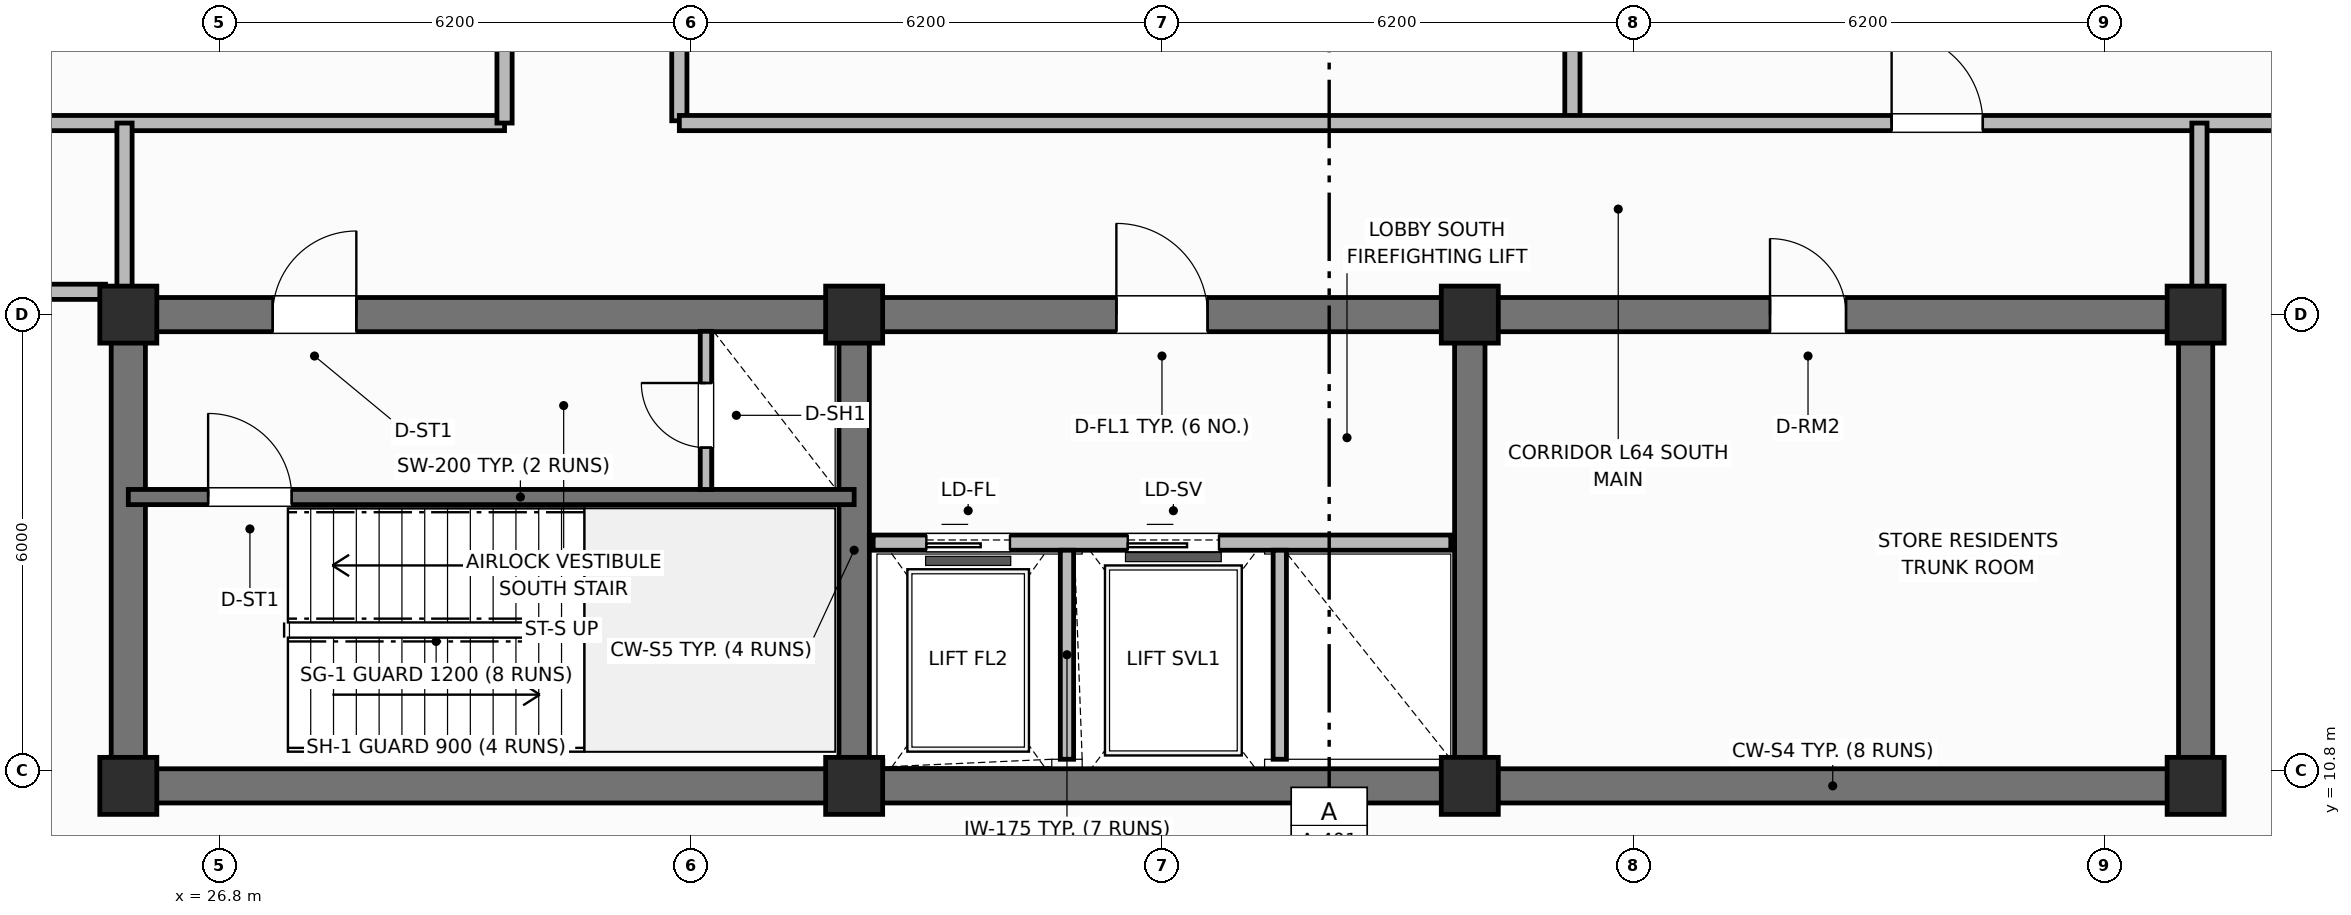
"""IFC4 building model, lengths in metres.
Left out: names, types, materials, properties, quantities, classifications, styles, units other than length and angle.
Written with IfcOpenShell. Run it as: python <this file> out.ifc"""

import sys

from ifc_helpers import new_model, si_unit, direction, frame, frame_2d, origin, origin_2d, place, context, subcontext, project, spatial, rectangle, extrude, element, fill, save


model = new_model("IFC4")
c1 = context("Model", 3, precision=1e-05, world=origin(), true_north=direction((0.0, 1.0)))
c2 = subcontext(c1, "Body", "Model", "MODEL_VIEW")
j1 = project(units=[si_unit("LENGTHUNIT", "METRE"), si_unit("PLANEANGLEUNIT", "RADIAN")], contexts=[c1])
p1 = place(None, origin())
s1 = spatial("IfcSite", under=j1, at=p1, CompositionType="ELEMENT")
p2 = place(p1, origin())
s2 = spatial("IfcBuilding", under=s1, at=p2, CompositionType="ELEMENT")
p3 = place(p2, frame((0.0, 0.0, 255.4)))
s3 = spatial("IfcBuildingStorey", under=s2, at=p3, CompositionType="ELEMENT", Elevation=255.4)
p4 = place(p3, frame((52.8, 10.6, 0.0), z_axis=(0.0, 0.0, 1.0), x_axis=(-1.0, 0.0, 0.0)))
e1 = element("IfcWall", 1, at=p4, inside=s3, PredefinedType="SHEAR", context=c2, shape_type="SweptSolid", body=[
    extrude(rectangle(XDim=27.2, YDim=0.45, at=frame_2d((13.6, 0.0))), origin(), (0.0, 0.0, 1.0), 4.8),
])
for number, where, z_axis, x_axis in (
    (2, (25.6, 10.825, 0.0), (0.0, 0.0, 1.0), (0.0, 1.0, 0.0)),
    (3, (52.8, 10.825, 0.0), (0.0, 0.0, 1.0), (0.0, 1.0, 0.0)),
):
    element("IfcWall", number, at=place(p3, frame(where, z_axis=z_axis, x_axis=x_axis)), inside=s3, PredefinedType="SHEAR", context=c2, shape_type="SweptSolid", body=[
        extrude(rectangle(XDim=5.75, YDim=0.45, at=frame_2d((2.875, 0.0))), origin(), (0.0, 0.0, 1.0), 4.8),
    ])
p5 = place(p3, frame((25.6, 16.8, 0.0), z_axis=(0.0, 0.0, 1.0), x_axis=(1.0, 0.0, 0.0)))
e4 = element("IfcWall", 4, at=p5, inside=s3, PredefinedType="SHEAR", context=c2, shape_type="SweptSolid", body=[
    extrude(rectangle(XDim=27.2, YDim=0.45, at=frame_2d((13.6, 0.0))), origin(), (0.0, 0.0, 1.0), 4.8),
])
p6 = place(p5, frame((1.9, 0.0, 0.0)))
e5 = element("IfcOpeningElement", 5, at=p6, cuts=e4, PredefinedType="OPENING", context=c2, shape_type="SweptSolid", body=[
    extrude(rectangle(XDim=1.1, YDim=2.15, at=frame_2d((0.55, 1.075))), frame((0.0, 0.235, 0.0), z_axis=(0.0, -1.0, 0.0), x_axis=(1.0, 0.0, 0.0)), (0.0, 0.0, 1.0), 0.47),
])
p7 = place(p5, frame((13.0, 0.0, 0.0)))
e6 = element("IfcOpeningElement", 6, at=p7, cuts=e4, PredefinedType="OPENING", context=c2, shape_type="SweptSolid", body=[
    extrude(rectangle(XDim=1.2, YDim=2.15, at=frame_2d((0.6, 1.075))), frame((0.0, 0.235, 0.0), z_axis=(0.0, -1.0, 0.0), x_axis=(1.0, 0.0, 0.0)), (0.0, 0.0, 1.0), 0.47),
])
p8 = place(p5, frame((21.6, 0.0, 0.0)))
e7 = element("IfcOpeningElement", 7, at=p8, cuts=e4, PredefinedType="OPENING", context=c2, shape_type="SweptSolid", body=[
    extrude(rectangle(XDim=1.0, YDim=2.15, at=frame_2d((0.5, 1.075))), frame((0.0, 0.235, 0.0), z_axis=(0.0, -1.0, 0.0), x_axis=(1.0, 0.0, 0.0)), (0.0, 0.0, 1.0), 0.47),
])
for number, where, z_axis, x_axis in (
    (8, (35.15, 10.825, 0.0), (0.0, 0.0, 1.0), (0.0, 1.0, 0.0)),
    (9, (43.25, 10.825, 0.0), (0.0, 0.0, 1.0), (0.0, 1.0, 0.0)),
):
    element("IfcWall", number, at=place(p3, frame(where, z_axis=z_axis, x_axis=x_axis)), inside=s3, PredefinedType="SHEAR", context=c2, shape_type="SweptSolid", body=[
        extrude(rectangle(XDim=5.75, YDim=0.4, at=frame_2d((2.875, 0.0))), origin(), (0.0, 0.0, 1.0), 4.8),
    ])
for number, where, z_axis, x_axis in (
    (10, (25.6, 10.6, 0.0), (0.0, 0.0, 1.0), (1.0, 0.0, 0.0)),
    (11, (25.6, 16.8, 0.0), (0.0, 0.0, 1.0), (1.0, 0.0, 0.0)),
    (12, (35.15, 10.6, 0.0), (0.0, 0.0, 1.0), (1.0, 0.0, 0.0)),
    (13, (35.15, 16.8, 0.0), (0.0, 0.0, 1.0), (1.0, 0.0, 0.0)),
    (14, (43.25, 10.6, 0.0), (0.0, 0.0, 1.0), (1.0, 0.0, 0.0)),
    (15, (43.25, 16.8, 0.0), (0.0, 0.0, 1.0), (1.0, 0.0, 0.0)),
    (16, (52.8, 10.6, 0.0), (0.0, 0.0, 1.0), (1.0, 0.0, 0.0)),
    (17, (52.8, 16.8, 0.0), (0.0, 0.0, 1.0), (1.0, 0.0, 0.0)),
):
    element("IfcColumn", number, at=place(p3, frame(where, z_axis=z_axis, x_axis=x_axis)), inside=s3, PredefinedType="COLUMN", context=c2, shape_type="SweptSolid", body=[
        extrude(rectangle(XDim=0.75, YDim=0.75, at=origin_2d()), origin(), (0.0, 0.0, 1.0), 4.8),
    ])
p9 = place(p3, frame((25.6, 14.4, 0.0), z_axis=(0.0, 0.0, 1.0), x_axis=(1.0, 0.0, 0.0)))
e18 = element("IfcWall", 18, at=p9, inside=s3, PredefinedType="SHEAR", context=c2, shape_type="SweptSolid", body=[
    extrude(rectangle(XDim=9.55, YDim=0.2, at=frame_2d((4.775, 0.0))), origin(), (0.0, 0.0, 1.0), 4.8),
])
p10 = place(p9, frame((1.05, 0.0, 0.0)))
e19 = element("IfcOpeningElement", 19, at=p10, cuts=e18, PredefinedType="OPENING", context=c2, shape_type="SweptSolid", body=[
    extrude(rectangle(XDim=1.1, YDim=2.15, at=frame_2d((0.55, 1.075))), frame((0.0, 0.11, 0.0), z_axis=(0.0, -1.0, 0.0), x_axis=(1.0, 0.0, 0.0)), (0.0, 0.0, 1.0), 0.22),
])
p11 = place(p3, frame((33.2, 14.5, 0.0), z_axis=(0.0, 0.0, 1.0), x_axis=(0.0, 1.0, 0.0)))
e20 = element("IfcWall", 20, at=p11, inside=s3, PredefinedType="PARTITIONING", context=c2, shape_type="SweptSolid", body=[
    extrude(rectangle(XDim=2.08, YDim=0.15, at=frame_2d((1.04, 0.0))), origin(), (0.0, 0.0, 1.0), 3.66),
])
p12 = place(p11, frame((0.55, 0.0, 0.0)))
e21 = element("IfcOpeningElement", 21, at=p12, cuts=e20, PredefinedType="OPENING", context=c2, shape_type="SweptSolid", body=[
    extrude(rectangle(XDim=0.85, YDim=2.05, at=frame_2d((0.425, 1.025))), frame((0.0, 0.085, 0.0), z_axis=(0.0, -1.0, 0.0), x_axis=(1.0, 0.0, 0.0)), (0.0, 0.0, 1.0), 0.17),
])
p13 = place(p3, frame((35.4, 13.8, 0.0), z_axis=(0.0, 0.0, 1.0), x_axis=(1.0, 0.0, 0.0)))
e22 = element("IfcWall", 22, at=p13, inside=s3, PredefinedType="PARTITIONING", context=c2, shape_type="SweptSolid", body=[
    extrude(rectangle(XDim=7.6, YDim=0.2, at=frame_2d((3.8, 0.0))), origin(), (0.0, 0.0, 1.0), 3.43),
])
p14 = place(p13, frame((0.7, 0.0, 0.0)))
e23 = element("IfcOpeningElement", 23, at=p14, cuts=e22, PredefinedType="OPENING", context=c2, shape_type="SweptSolid", body=[
    extrude(rectangle(XDim=1.1, YDim=2.15, at=frame_2d((0.55, 1.075))), frame((0.0, 0.11, 0.0), z_axis=(0.0, -1.0, 0.0), x_axis=(1.0, 0.0, 0.0)), (0.0, 0.0, 1.0), 0.22),
])
p15 = place(p13, frame((3.35, 0.0, 0.0)))
e24 = element("IfcOpeningElement", 24, at=p15, cuts=e22, PredefinedType="OPENING", context=c2, shape_type="SweptSolid", body=[
    extrude(rectangle(XDim=1.2, YDim=2.15, at=frame_2d((0.6, 1.075))), frame((0.0, 0.11, 0.0), z_axis=(0.0, -1.0, 0.0), x_axis=(1.0, 0.0, 0.0)), (0.0, 0.0, 1.0), 0.22),
])
for number, where, z_axis, x_axis in (
    (25, (37.95, 10.95, 0.0), (0.0, 0.0, 1.0), (0.0, 1.0, 0.0)),
    (26, (40.75, 10.95, 0.0), (0.0, 0.0, 1.0), (0.0, 1.0, 0.0)),
):
    element("IfcWall", number, at=place(p3, frame(where, z_axis=z_axis, x_axis=x_axis)), inside=s3, PredefinedType="PARTITIONING", context=c2, shape_type="SweptSolid", body=[
        extrude(rectangle(XDim=2.75, YDim=0.175, at=frame_2d((1.375, 0.0))), origin(), (0.0, 0.0, 1.0), 3.66),
    ])
p16 = place(p3, frame((19.53, 19.32, 0.0), z_axis=(0.0, 0.0, 1.0), x_axis=(1.0, 0.0, 0.0)))
e27 = element("IfcWall", 27, at=p16, inside=s3, PredefinedType="PARTITIONING", context=c2, shape_type="SweptSolid", body=[
    extrude(rectangle(XDim=11.02, YDim=0.2, at=frame_2d((5.51, 0.0))), origin(), (0.0, 0.0, 1.0), 3.66),
])
p17 = place(p3, frame((30.55, 19.32, 0.0), z_axis=(0.0, 0.0, 1.0), x_axis=(0.0, 1.0, 0.0)))
e28 = element("IfcWall", 28, at=p17, inside=s3, PredefinedType="PARTITIONING", context=c2, shape_type="SweptSolid", body=[
    extrude(rectangle(XDim=17.76, YDim=0.2, at=frame_2d((8.88, 0.0))), origin(), (0.0, 0.0, 1.0), 3.66),
])
p18 = place(p17, frame((6.0, 0.0, 0.0)))
e29 = element("IfcOpeningElement", 29, at=p18, cuts=e28, PredefinedType="OPENING", context=c2, shape_type="SweptSolid", body=[
    extrude(rectangle(XDim=1.2, YDim=2.15, at=frame_2d((0.6, 1.075))), frame((0.0, 0.11, 0.0), z_axis=(0.0, -1.0, 0.0), x_axis=(1.0, 0.0, 0.0)), (0.0, 0.0, 1.0), 0.22),
])
p19 = place(p3, frame((32.85, 19.35, 0.0), z_axis=(0.0, 0.0, 1.0), x_axis=(0.0, 1.0, 0.0)))
e30 = element("IfcWall", 30, at=p19, inside=s3, PredefinedType="PARTITIONING", context=c2, shape_type="SweptSolid", body=[
    extrude(rectangle(XDim=17.7, YDim=0.2, at=frame_2d((8.85, 0.0))), origin(), (0.0, 0.0, 1.0), 3.66),
])
p20 = place(p19, frame((6.0, 0.0, 0.0)))
e31 = element("IfcOpeningElement", 31, at=p20, cuts=e30, PredefinedType="OPENING", context=c2, shape_type="SweptSolid", body=[
    extrude(rectangle(XDim=1.2, YDim=2.15, at=frame_2d((0.6, 1.075))), frame((0.0, 0.11, 0.0), z_axis=(0.0, -1.0, 0.0), x_axis=(1.0, 0.0, 0.0)), (0.0, 0.0, 1.0), 0.22),
])
p21 = place(p3, frame((44.6, 19.35, 0.0), z_axis=(0.0, 0.0, 1.0), x_axis=(0.0, 1.0, 0.0)))
e32 = element("IfcWall", 32, at=p21, inside=s3, PredefinedType="PARTITIONING", context=c2, shape_type="SweptSolid", body=[
    extrude(rectangle(XDim=17.7, YDim=0.2, at=frame_2d((8.85, 0.0))), origin(), (0.0, 0.0, 1.0), 3.66),
])
p22 = place(p3, frame((32.85, 19.32, 0.0), z_axis=(0.0, 0.0, 1.0), x_axis=(1.0, 0.0, 0.0)))
e33 = element("IfcWall", 33, at=p22, inside=s3, PredefinedType="PARTITIONING", context=c2, shape_type="SweptSolid", body=[
    extrude(rectangle(XDim=26.02, YDim=0.2, at=frame_2d((13.01, 0.0))), origin(), (0.0, 0.0, 1.0), 3.66),
])
p23 = place(p22, frame((15.95, 0.0, 0.0)))
e34 = element("IfcOpeningElement", 34, at=p23, cuts=e33, PredefinedType="OPENING", context=c2, shape_type="SweptSolid", body=[
    extrude(rectangle(XDim=1.2, YDim=2.15, at=frame_2d((0.6, 1.075))), frame((0.0, 0.11, 0.0), z_axis=(0.0, -1.0, 0.0), x_axis=(1.0, 0.0, 0.0)), (0.0, 0.0, 1.0), 0.22),
])
for number, where, z_axis, x_axis in (
    (35, (52.85, 16.95, 0.0), (0.0, 0.0, 1.0), (0.0, 1.0, 0.0)),
    (36, (25.55, 16.95, 0.0), (0.0, 0.0, 1.0), (0.0, 1.0, 0.0)),
):
    element("IfcWall", number, at=place(p3, frame(where, z_axis=z_axis, x_axis=x_axis)), inside=s3, PredefinedType="PARTITIONING", context=c2, shape_type="SweptSolid", body=[
        extrude(rectangle(XDim=2.37, YDim=0.2, at=frame_2d((1.185, 0.0))), origin(), (0.0, 0.0, 1.0), 3.66),
    ])
p24 = place(p3, frame((19.53, 17.1, 0.0), z_axis=(0.0, 0.0, 1.0), x_axis=(1.0, 0.0, 0.0)))
e37 = element("IfcWall", 37, at=p24, inside=s3, PredefinedType="PARTITIONING", context=c2, shape_type="SweptSolid", body=[
    extrude(rectangle(XDim=5.77, YDim=0.2, at=frame_2d((2.885, 0.0))), origin(), (0.0, 0.0, 1.0), 3.66),
])
p25 = place(p10, origin())
e38 = element("IfcDoor", 38, at=p25, inside=s3, OperationType="SINGLE_SWING_LEFT", PredefinedType="DOOR", context=c2, shape_type="SweptSolid", body=[
    extrude(rectangle(XDim=1.1, YDim=2.15, at=frame_2d((0.55, 1.075))), frame((0.0, 0.025, 0.0), z_axis=(0.0, -1.0, 0.0), x_axis=(1.0, 0.0, 0.0)), (0.0, 0.0, 1.0), 0.05),
])
fill(e19, e38)
p26 = place(p12, origin())
e39 = element("IfcDoor", 39, at=p26, inside=s3, OperationType="SINGLE_SWING_RIGHT", PredefinedType="TRAPDOOR", context=c2, shape_type="SweptSolid", body=[
    extrude(rectangle(XDim=0.85, YDim=2.05, at=frame_2d((0.425, 1.025))), frame((0.0, 0.025, 0.0), z_axis=(0.0, -1.0, 0.0), x_axis=(1.0, 0.0, 0.0)), (0.0, 0.0, 1.0), 0.05),
])
fill(e21, e39)
p27 = place(p14, origin())
e40 = element("IfcDoor", 40, at=p27, inside=s3, OperationType="SLIDING_TO_LEFT", PredefinedType="DOOR", context=c2, shape_type="SweptSolid", body=[
    extrude(rectangle(XDim=1.1, YDim=2.15, at=frame_2d((0.55, 1.075))), frame((0.0, 0.025, 0.0), z_axis=(0.0, -1.0, 0.0), x_axis=(1.0, 0.0, 0.0)), (0.0, 0.0, 1.0), 0.05),
])
fill(e23, e40)
p28 = place(p15, origin())
e41 = element("IfcDoor", 41, at=p28, inside=s3, OperationType="SLIDING_TO_LEFT", PredefinedType="DOOR", context=c2, shape_type="SweptSolid", body=[
    extrude(rectangle(XDim=1.2, YDim=2.15, at=frame_2d((0.6, 1.075))), frame((0.0, 0.025, 0.0), z_axis=(0.0, -1.0, 0.0), x_axis=(1.0, 0.0, 0.0)), (0.0, 0.0, 1.0), 0.05),
])
fill(e24, e41)
p29 = place(p23, origin())
e42 = element("IfcDoor", 42, at=p29, inside=s3, OperationType="SINGLE_SWING_LEFT", PredefinedType="DOOR", context=c2, shape_type="SweptSolid", body=[
    extrude(rectangle(XDim=1.2, YDim=2.15, at=frame_2d((0.6, 1.075))), frame((0.0, 0.025, 0.0), z_axis=(0.0, -1.0, 0.0), x_axis=(1.0, 0.0, 0.0)), (0.0, 0.0, 1.0), 0.05),
])
fill(e34, e42)
p30 = place(p6, origin())
e43 = element("IfcDoor", 43, at=p30, inside=s3, OperationType="SINGLE_SWING_RIGHT", PredefinedType="DOOR", context=c2, shape_type="SweptSolid", body=[
    extrude(rectangle(XDim=1.1, YDim=2.15, at=frame_2d((0.55, 1.075))), frame((0.0, 0.025, 0.0), z_axis=(0.0, -1.0, 0.0), x_axis=(1.0, 0.0, 0.0)), (0.0, 0.0, 1.0), 0.05),
])
fill(e5, e43)
p31 = place(p7, origin())
e44 = element("IfcDoor", 44, at=p31, inside=s3, OperationType="SINGLE_SWING_LEFT", PredefinedType="DOOR", context=c2, shape_type="SweptSolid", body=[
    extrude(rectangle(XDim=1.2, YDim=2.15, at=frame_2d((0.6, 1.075))), frame((0.0, 0.025, 0.0), z_axis=(0.0, -1.0, 0.0), x_axis=(1.0, 0.0, 0.0)), (0.0, 0.0, 1.0), 0.05),
])
fill(e6, e44)
p32 = place(p8, origin())
e45 = element("IfcDoor", 45, at=p32, inside=s3, OperationType="SINGLE_SWING_LEFT", PredefinedType="DOOR", context=c2, shape_type="SweptSolid", body=[
    extrude(rectangle(XDim=1.0, YDim=2.15, at=frame_2d((0.5, 1.075))), frame((0.0, 0.025, 0.0), z_axis=(0.0, -1.0, 0.0), x_axis=(1.0, 0.0, 0.0)), (0.0, 0.0, 1.0), 0.05),
])
fill(e7, e45)
save(model, sys.argv[1])
